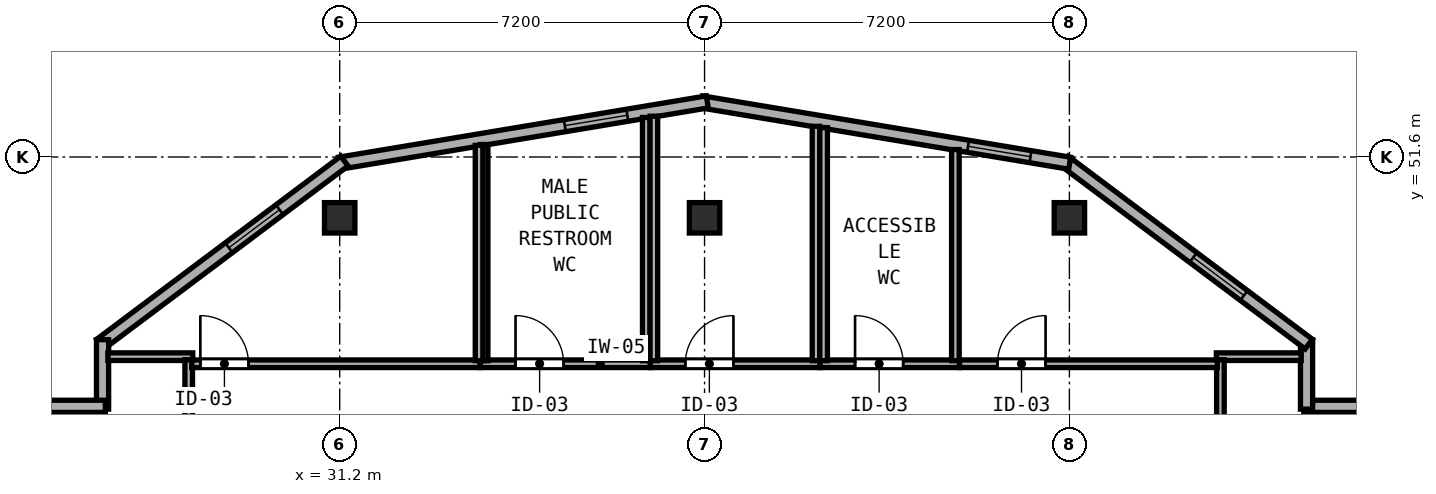
"""IFC4 building model, lengths in metres.
Left out: names, types, materials, properties, quantities, classifications, styles, units other than length and angle.
Written with IfcOpenShell. Run it as: python <this file> out.ifc"""

import sys

from ifc_helpers import new_model, si_unit, direction, frame, frame_2d, origin, origin_2d, place, context, subcontext, project, spatial, rectangle, hollow_rectangle, extrude, element, fill, save


model = new_model("IFC4")
c1 = context("Model", 3, precision=1e-05, world=origin(), true_north=direction((0.0, 1.0)))
c2 = subcontext(c1, "Body", "Model", "MODEL_VIEW")
j1 = project(units=[si_unit("LENGTHUNIT", "METRE"), si_unit("PLANEANGLEUNIT", "RADIAN")], contexts=[c1])
p1 = place(None, origin())
s1 = spatial("IfcSite", under=j1, at=p1, CompositionType="ELEMENT")
p2 = place(p1, origin())
s2 = spatial("IfcBuilding", under=s1, at=p2, CompositionType="ELEMENT")
p3 = place(p2, frame((0.0, 0.0, 323.2)))
s3 = spatial("IfcBuildingStorey", under=s2, at=p3, CompositionType="ELEMENT", Elevation=323.2)
for number, where, z_axis, x_axis in (
    (1, (31.2, 50.4, 0.0), (0.0, 0.0, 1.0), (1.0, 0.0, 0.0)),
    (2, (45.6, 50.4, 0.0), (0.0, 0.0, 1.0), (1.0, 0.0, 0.0)),
    (3, (38.4, 50.4, 0.0), (0.0, 0.0, 1.0), (1.0, 0.0, 0.0)),
):
    element("IfcColumn", number, at=place(p3, frame(where, z_axis=z_axis, x_axis=x_axis)), inside=s3, PredefinedType="COLUMN", context=c2, shape_type="SweptSolid", body=[
        extrude(hollow_rectangle(XDim=0.6, YDim=0.6, WallThickness=0.024, at=origin_2d()), origin(), (0.0, 0.0, 1.0), 5.0),
    ])
p4 = place(p3, frame((51.535, 46.68, 0.0), z_axis=(0.0, 0.0, 1.0), x_axis=(-1.0, 0.0, 0.0)))
e4 = element("IfcWall", 4, at=p4, inside=s3, PredefinedType="SOLIDWALL", context=c2, shape_type="SweptSolid", body=[
    extrude(rectangle(XDim=1.31, YDim=0.24, at=frame_2d((0.655, 0.0))), origin(), (0.0, 0.0, 1.0), 4.75),
])
p5 = place(p3, frame((50.28, 46.625, 0.0), z_axis=(0.0, 0.0, 1.0), x_axis=(0.0, 1.0, 0.0)))
e5 = element("IfcWall", 5, at=p5, inside=s3, PredefinedType="SOLIDWALL", context=c2, shape_type="SweptSolid", body=[
    extrude(rectangle(XDim=1.37, YDim=0.24, at=frame_2d((0.685, 0.0))), origin(), (0.0, 0.0, 1.0), 4.75),
])
p6 = place(p3, frame((50.324, 47.907, 0.0), z_axis=(0.0, 0.0, 1.0), x_axis=(-0.80001459783, 0.599980535734, 0.0)))
e6 = element("IfcWall", 6, at=p6, inside=s3, PredefinedType="SOLIDWALL", context=c2, shape_type="SweptSolid", body=[
    extrude(rectangle(XDim=6.021, YDim=0.24, at=frame_2d((3.01, 0.0))), origin(), (0.0, 0.0, 1.0), 4.75),
])
p7 = place(p6, frame((1.6, 0.0, 0.85)))
e7 = element("IfcOpeningElement", 7, at=p7, cuts=e6, PredefinedType="OPENING", context=c2, shape_type="SweptSolid", body=[
    extrude(rectangle(XDim=1.25, YDim=1.95, at=frame_2d((0.625, 0.975))), frame((0.0, 0.13, 0.0), z_axis=(0.0, -1.0, 0.0), x_axis=(1.0, 0.0, 0.0)), (0.0, 0.0, 1.0), 0.26),
])
p8 = place(p3, frame((45.606, 51.477, 0.0), z_axis=(0.0, 0.0, 1.0), x_axis=(-0.986394820321, 0.164393608283, 0.0)))
e8 = element("IfcWall", 8, at=p8, inside=s3, PredefinedType="SOLIDWALL", context=c2, shape_type="SweptSolid", body=[
    extrude(rectangle(XDim=7.36, YDim=0.24, at=frame_2d((3.68, 0.0))), origin(), (0.0, 0.0, 1.0), 4.75),
])
p9 = place(p8, frame((0.784, 0.0, 0.85)))
e9 = element("IfcOpeningElement", 9, at=p9, cuts=e8, PredefinedType="OPENING", context=c2, shape_type="SweptSolid", body=[
    extrude(rectangle(XDim=1.25, YDim=1.95, at=frame_2d((0.625, 0.975))), frame((0.0, 0.13, 0.0), z_axis=(0.0, -1.0, 0.0), x_axis=(1.0, 0.0, 0.0)), (0.0, 0.0, 1.0), 0.26),
])
p10 = place(p3, frame((38.454, 52.687, 0.0), z_axis=(0.0, 0.0, 1.0), x_axis=(-0.986394820321, -0.164393608283, 0.0)))
e10 = element("IfcWall", 10, at=p10, inside=s3, PredefinedType="SOLIDWALL", context=c2, shape_type="SweptSolid", body=[
    extrude(rectangle(XDim=7.36, YDim=0.24, at=frame_2d((3.68, 0.0))), origin(), (0.0, 0.0, 1.0), 4.75),
])
p11 = place(p10, frame((1.6, 0.0, 0.85)))
e11 = element("IfcOpeningElement", 11, at=p11, cuts=e10, PredefinedType="OPENING", context=c2, shape_type="SweptSolid", body=[
    extrude(rectangle(XDim=1.25, YDim=1.95, at=frame_2d((0.625, 0.975))), frame((0.0, 0.13, 0.0), z_axis=(0.0, -1.0, 0.0), x_axis=(1.0, 0.0, 0.0)), (0.0, 0.0, 1.0), 0.26),
])
p12 = place(p3, frame((31.292, 51.519, 0.0), z_axis=(0.0, 0.0, 1.0), x_axis=(-0.8, -0.6, 0.0)))
e12 = element("IfcWall", 12, at=p12, inside=s3, PredefinedType="SOLIDWALL", context=c2, shape_type="SweptSolid", body=[
    extrude(rectangle(XDim=6.021, YDim=0.24, at=frame_2d((3.01, 0.0))), origin(), (0.0, 0.0, 1.0), 4.75),
])
p13 = place(p12, frame((1.6, 0.0, 0.85)))
e13 = element("IfcOpeningElement", 13, at=p13, cuts=e12, PredefinedType="OPENING", context=c2, shape_type="SweptSolid", body=[
    extrude(rectangle(XDim=1.25, YDim=1.95, at=frame_2d((0.625, 0.975))), frame((0.0, 0.13, 0.0), z_axis=(0.0, -1.0, 0.0), x_axis=(1.0, 0.0, 0.0)), (0.0, 0.0, 1.0), 0.26),
])
p14 = place(p3, frame((26.52, 47.995, 0.0), z_axis=(0.0, 0.0, 1.0), x_axis=(0.0, -1.0, 0.0)))
e14 = element("IfcWall", 14, at=p14, inside=s3, PredefinedType="SOLIDWALL", context=c2, shape_type="SweptSolid", body=[
    extrude(rectangle(XDim=1.37, YDim=0.24, at=frame_2d((0.685, 0.0))), origin(), (0.0, 0.0, 1.0), 4.75),
])
p15 = place(p3, frame((26.575, 46.68, 0.0), z_axis=(0.0, 0.0, 1.0), x_axis=(-1.0, 0.0, 0.0)))
e15 = element("IfcWall", 15, at=p15, inside=s3, PredefinedType="SOLIDWALL", context=c2, shape_type="SweptSolid", body=[
    extrude(rectangle(XDim=1.31, YDim=0.24, at=frame_2d((0.655, 0.0))), origin(), (0.0, 0.0, 1.0), 4.75),
])
p16 = place(p3, frame((33.97, 47.52, 0.0), z_axis=(0.0, 0.0, 1.0), x_axis=(1.0, 0.0, 0.0)))
e16 = element("IfcWall", 16, at=p16, inside=s3, PredefinedType="PARTITIONING", context=c2, shape_type="SweptSolid", body=[
    extrude(rectangle(XDim=3.36, YDim=0.15, at=frame_2d((1.68, 0.0))), origin(), (0.0, 0.0, 1.0), 4.75),
])
p17 = place(p16, frame((0.7, 0.0, 0.0)))
e17 = element("IfcOpeningElement", 17, at=p17, cuts=e16, PredefinedType="OPENING", context=c2, shape_type="SweptSolid", body=[
    extrude(rectangle(XDim=0.95, YDim=2.12, at=frame_2d((0.475, 1.06))), frame((0.0, 0.085, 0.0), z_axis=(0.0, -1.0, 0.0), x_axis=(1.0, 0.0, 0.0)), (0.0, 0.0, 1.0), 0.17),
])
p18 = place(p3, frame((34.05, 47.58, 0.0), z_axis=(0.0, 0.0, 1.0), x_axis=(0.0, 1.0, 0.0)))
e18 = element("IfcWall", 18, at=p18, inside=s3, PredefinedType="PARTITIONING", context=c2, shape_type="SweptSolid", body=[
    extrude(rectangle(XDim=4.267, YDim=0.15, at=frame_2d((2.133, 0.0))), origin(), (0.0, 0.0, 1.0), 4.75),
])
p19 = place(p3, frame((37.25, 47.58, 0.0), z_axis=(0.0, 0.0, 1.0), x_axis=(0.0, 1.0, 0.0)))
e19 = element("IfcWall", 19, at=p19, inside=s3, PredefinedType="PARTITIONING", context=c2, shape_type="SweptSolid", body=[
    extrude(rectangle(XDim=4.8, YDim=0.15, at=frame_2d((2.4, 0.0))), origin(), (0.0, 0.0, 1.0), 4.75),
])
p20 = place(p3, frame((37.332, 47.52, 0.0), z_axis=(0.0, 0.0, 1.0), x_axis=(1.0, 0.0, 0.0)))
e20 = element("IfcWall", 20, at=p20, inside=s3, PredefinedType="PARTITIONING", context=c2, shape_type="SweptSolid", body=[
    extrude(rectangle(XDim=3.348, YDim=0.15, at=frame_2d((1.674, 0.0))), origin(), (0.0, 0.0, 1.0), 4.75),
])
p21 = place(p20, frame((0.688, 0.0, 0.0)))
e21 = element("IfcOpeningElement", 21, at=p21, cuts=e20, PredefinedType="OPENING", context=c2, shape_type="SweptSolid", body=[
    extrude(rectangle(XDim=0.95, YDim=2.12, at=frame_2d((0.475, 1.06))), frame((0.0, 0.085, 0.0), z_axis=(0.0, -1.0, 0.0), x_axis=(1.0, 0.0, 0.0)), (0.0, 0.0, 1.0), 0.17),
])
p22 = place(p3, frame((37.4, 47.58, 0.0), z_axis=(0.0, 0.0, 1.0), x_axis=(0.0, 1.0, 0.0)))
e22 = element("IfcWall", 22, at=p22, inside=s3, PredefinedType="PARTITIONING", context=c2, shape_type="SweptSolid", body=[
    extrude(rectangle(XDim=4.825, YDim=0.15, at=frame_2d((2.413, 0.0))), origin(), (0.0, 0.0, 1.0), 4.75),
])
p23 = place(p3, frame((40.6, 47.58, 0.0), z_axis=(0.0, 0.0, 1.0), x_axis=(0.0, 1.0, 0.0)))
e23 = element("IfcWall", 23, at=p23, inside=s3, PredefinedType="PARTITIONING", context=c2, shape_type="SweptSolid", body=[
    extrude(rectangle(XDim=4.625, YDim=0.15, at=frame_2d((2.312, 0.0))), origin(), (0.0, 0.0, 1.0), 4.75),
])
p24 = place(p3, frame((40.682, 47.52, 0.0), z_axis=(0.0, 0.0, 1.0), x_axis=(1.0, 0.0, 0.0)))
e24 = element("IfcWall", 24, at=p24, inside=s3, PredefinedType="PARTITIONING", context=c2, shape_type="SweptSolid", body=[
    extrude(rectangle(XDim=2.748, YDim=0.15, at=frame_2d((1.374, 0.0))), origin(), (0.0, 0.0, 1.0), 4.75),
])
p25 = place(p24, frame((0.688, 0.0, 0.0)))
e25 = element("IfcOpeningElement", 25, at=p25, cuts=e24, PredefinedType="OPENING", context=c2, shape_type="SweptSolid", body=[
    extrude(rectangle(XDim=0.95, YDim=2.12, at=frame_2d((0.475, 1.06))), frame((0.0, 0.085, 0.0), z_axis=(0.0, -1.0, 0.0), x_axis=(1.0, 0.0, 0.0)), (0.0, 0.0, 1.0), 0.17),
])
p26 = place(p3, frame((40.75, 47.58, 0.0), z_axis=(0.0, 0.0, 1.0), x_axis=(0.0, 1.0, 0.0)))
e26 = element("IfcWall", 26, at=p26, inside=s3, PredefinedType="PARTITIONING", context=c2, shape_type="SweptSolid", body=[
    extrude(rectangle(XDim=4.6, YDim=0.15, at=frame_2d((2.3, 0.0))), origin(), (0.0, 0.0, 1.0), 4.75),
])
p27 = place(p3, frame((43.35, 47.58, 0.0), z_axis=(0.0, 0.0, 1.0), x_axis=(0.0, 1.0, 0.0)))
e27 = element("IfcWall", 27, at=p27, inside=s3, PredefinedType="PARTITIONING", context=c2, shape_type="SweptSolid", body=[
    extrude(rectangle(XDim=4.167, YDim=0.15, at=frame_2d((2.083, 0.0))), origin(), (0.0, 0.0, 1.0), 4.75),
])
p28 = place(p3, frame((26.625, 47.66, 0.0), z_axis=(0.0, 0.0, 1.0), x_axis=(1.0, 0.0, 0.0)))
e28 = element("IfcWall", 28, at=p28, inside=s3, PredefinedType="PARTITIONING", context=c2, shape_type="SweptSolid", body=[
    extrude(rectangle(XDim=1.675, YDim=0.15, at=frame_2d((0.837, 0.0))), origin(), (0.0, 0.0, 1.0), 4.75),
])
p29 = place(p3, frame((28.22, 42.82, 0.0), z_axis=(0.0, 0.0, 1.0), x_axis=(0.0, 1.0, 0.0)))
e29 = element("IfcWall", 29, at=p29, inside=s3, PredefinedType="PARTITIONING", context=c2, shape_type="SweptSolid", body=[
    extrude(rectangle(XDim=4.78, YDim=0.15, at=frame_2d((2.39, 0.0))), origin(), (0.0, 0.0, 1.0), 4.75),
])
p30 = place(p29, frame((2.61, 0.0, 0.0), z_axis=(0.0, 0.0, 1.0), x_axis=(-1.0, 0.0, 0.0)))
e30 = element("IfcOpeningElement", 30, at=p30, cuts=e29, PredefinedType="OPENING", context=c2, shape_type="SweptSolid", body=[
    extrude(rectangle(XDim=0.95, YDim=2.12, at=frame_2d((0.475, 1.06))), frame((0.0, 0.085, 0.0), z_axis=(0.0, -1.0, 0.0), x_axis=(1.0, 0.0, 0.0)), (0.0, 0.0, 1.0), 0.17),
])
p31 = place(p3, frame((48.5, 47.66, 0.0), z_axis=(0.0, 0.0, 1.0), x_axis=(1.0, 0.0, 0.0)))
e31 = element("IfcWall", 31, at=p31, inside=s3, PredefinedType="PARTITIONING", context=c2, shape_type="SweptSolid", body=[
    extrude(rectangle(XDim=1.675, YDim=0.15, at=frame_2d((0.837, 0.0))), origin(), (0.0, 0.0, 1.0), 4.75),
])
p32 = place(p3, frame((48.58, 33.46, 0.0), z_axis=(0.0, 0.0, 1.0), x_axis=(0.0, 1.0, 0.0)))
e32 = element("IfcWall", 32, at=p32, inside=s3, PredefinedType="PARTITIONING", context=c2, shape_type="SweptSolid", body=[
    extrude(rectangle(XDim=14.14, YDim=0.15, at=frame_2d((7.07, 0.0))), origin(), (0.0, 0.0, 1.0), 4.75),
])
p33 = place(p32, frame((4.06, 0.0, 0.0)))
e33 = element("IfcOpeningElement", 33, at=p33, cuts=e32, PredefinedType="OPENING", context=c2, shape_type="SweptSolid", body=[
    extrude(rectangle(XDim=0.95, YDim=2.12, at=frame_2d((0.475, 1.06))), frame((0.0, 0.085, 0.0), z_axis=(0.0, -1.0, 0.0), x_axis=(1.0, 0.0, 0.0)), (0.0, 0.0, 1.0), 0.17),
])
p34 = place(p3, frame((28.28, 47.52, 0.0), z_axis=(0.0, 0.0, 1.0), x_axis=(1.0, 0.0, 0.0)))
e34 = element("IfcWall", 34, at=p34, inside=s3, PredefinedType="PARTITIONING", context=c2, shape_type="SweptSolid", body=[
    extrude(rectangle(XDim=5.688, YDim=0.15, at=frame_2d((2.844, 0.0))), origin(), (0.0, 0.0, 1.0), 4.75),
])
p35 = place(p34, frame((0.17, 0.0, 0.0)))
e35 = element("IfcOpeningElement", 35, at=p35, cuts=e34, PredefinedType="OPENING", context=c2, shape_type="SweptSolid", body=[
    extrude(rectangle(XDim=0.95, YDim=2.12, at=frame_2d((0.475, 1.06))), frame((0.0, 0.085, 0.0), z_axis=(0.0, -1.0, 0.0), x_axis=(1.0, 0.0, 0.0)), (0.0, 0.0, 1.0), 0.17),
])
p36 = place(p3, frame((33.95, 47.58, 0.0), z_axis=(0.0, 0.0, 1.0), x_axis=(0.0, 1.0, 0.0)))
e36 = element("IfcWall", 36, at=p36, inside=s3, PredefinedType="PARTITIONING", context=c2, shape_type="SweptSolid", body=[
    extrude(rectangle(XDim=4.25, YDim=0.15, at=frame_2d((2.125, 0.0))), origin(), (0.0, 0.0, 1.0), 4.75),
])
p37 = place(p3, frame((43.432, 47.52, 0.0), z_axis=(0.0, 0.0, 1.0), x_axis=(1.0, 0.0, 0.0)))
e37 = element("IfcWall", 37, at=p37, inside=s3, PredefinedType="PARTITIONING", context=c2, shape_type="SweptSolid", body=[
    extrude(rectangle(XDim=5.088, YDim=0.15, at=frame_2d((2.544, 0.0))), origin(), (0.0, 0.0, 1.0), 4.75),
])
p38 = place(p37, frame((0.748, 0.0, 0.0)))
e38 = element("IfcOpeningElement", 38, at=p38, cuts=e37, PredefinedType="OPENING", context=c2, shape_type="SweptSolid", body=[
    extrude(rectangle(XDim=0.95, YDim=2.12, at=frame_2d((0.475, 1.06))), frame((0.0, 0.085, 0.0), z_axis=(0.0, -1.0, 0.0), x_axis=(1.0, 0.0, 0.0)), (0.0, 0.0, 1.0), 0.17),
])
p39 = place(p7, origin())
e39 = element("IfcWindow", 39, at=p39, inside=s3, PartitioningType="SINGLE_PANEL", PredefinedType="WINDOW", context=c2, shape_type="SweptSolid", body=[
    extrude(rectangle(XDim=1.25, YDim=1.95, at=frame_2d((0.625, 0.975))), frame((0.0, 0.03, 0.0), z_axis=(0.0, -1.0, 0.0), x_axis=(1.0, 0.0, 0.0)), (0.0, 0.0, 1.0), 0.06),
])
fill(e7, e39)
p40 = place(p9, origin())
e40 = element("IfcWindow", 40, at=p40, inside=s3, PartitioningType="SINGLE_PANEL", PredefinedType="WINDOW", context=c2, shape_type="SweptSolid", body=[
    extrude(rectangle(XDim=1.25, YDim=1.95, at=frame_2d((0.625, 0.975))), frame((0.0, 0.03, 0.0), z_axis=(0.0, -1.0, 0.0), x_axis=(1.0, 0.0, 0.0)), (0.0, 0.0, 1.0), 0.06),
])
fill(e9, e40)
p41 = place(p11, origin())
e41 = element("IfcWindow", 41, at=p41, inside=s3, PartitioningType="SINGLE_PANEL", PredefinedType="WINDOW", context=c2, shape_type="SweptSolid", body=[
    extrude(rectangle(XDim=1.25, YDim=1.95, at=frame_2d((0.625, 0.975))), frame((0.0, 0.03, 0.0), z_axis=(0.0, -1.0, 0.0), x_axis=(1.0, 0.0, 0.0)), (0.0, 0.0, 1.0), 0.06),
])
fill(e11, e41)
p42 = place(p13, origin())
e42 = element("IfcWindow", 42, at=p42, inside=s3, PartitioningType="SINGLE_PANEL", PredefinedType="WINDOW", context=c2, shape_type="SweptSolid", body=[
    extrude(rectangle(XDim=1.25, YDim=1.95, at=frame_2d((0.625, 0.975))), frame((0.0, 0.03, 0.0), z_axis=(0.0, -1.0, 0.0), x_axis=(1.0, 0.0, 0.0)), (0.0, 0.0, 1.0), 0.06),
])
fill(e13, e42)
p43 = place(p3, frame((0.0, 0.0, -0.24)))
p44 = place(p43, frame((34.8, 49.8, 0.0)))
p45 = place(p44, frame((0.0, 0.0, 0.19)))
e43 = element("IfcWindow", 43, at=p45, inside=s3, PartitioningType="SINGLE_PANEL", PredefinedType="SKYLIGHT", context=c2, shape_type="SweptSolid", body=[
    extrude(rectangle(XDim=1.6, YDim=1.6, at=origin_2d()), origin(), (0.0, 0.0, 1.0), 0.05),
])
p46 = place(p43, frame((42.0, 49.8, 0.0)))
p47 = place(p46, frame((0.0, 0.0, 0.19)))
e44 = element("IfcWindow", 44, at=p47, inside=s3, PartitioningType="SINGLE_PANEL", PredefinedType="SKYLIGHT", context=c2, shape_type="SweptSolid", body=[
    extrude(rectangle(XDim=1.6, YDim=1.6, at=origin_2d()), origin(), (0.0, 0.0, 1.0), 0.05),
])
p48 = place(p17, origin())
e45 = element("IfcDoor", 45, at=p48, inside=s3, OperationType="SINGLE_SWING_LEFT", PredefinedType="DOOR", context=c2, shape_type="SweptSolid", body=[
    extrude(rectangle(XDim=0.95, YDim=2.12, at=frame_2d((0.475, 1.06))), frame((0.0, 0.025, 0.0), z_axis=(0.0, -1.0, 0.0), x_axis=(1.0, 0.0, 0.0)), (0.0, 0.0, 1.0), 0.05),
])
fill(e17, e45)
p49 = place(p21, origin())
e46 = element("IfcDoor", 46, at=p49, inside=s3, OperationType="SINGLE_SWING_RIGHT", PredefinedType="DOOR", context=c2, shape_type="SweptSolid", body=[
    extrude(rectangle(XDim=0.95, YDim=2.12, at=frame_2d((0.475, 1.06))), frame((0.0, 0.025, 0.0), z_axis=(0.0, -1.0, 0.0), x_axis=(1.0, 0.0, 0.0)), (0.0, 0.0, 1.0), 0.05),
])
fill(e21, e46)
p50 = place(p25, origin())
e47 = element("IfcDoor", 47, at=p50, inside=s3, OperationType="SINGLE_SWING_LEFT", PredefinedType="DOOR", context=c2, shape_type="SweptSolid", body=[
    extrude(rectangle(XDim=0.95, YDim=2.12, at=frame_2d((0.475, 1.06))), frame((0.0, 0.025, 0.0), z_axis=(0.0, -1.0, 0.0), x_axis=(1.0, 0.0, 0.0)), (0.0, 0.0, 1.0), 0.05),
])
fill(e25, e47)
p51 = place(p35, origin())
e48 = element("IfcDoor", 48, at=p51, inside=s3, OperationType="SINGLE_SWING_LEFT", PredefinedType="DOOR", context=c2, shape_type="SweptSolid", body=[
    extrude(rectangle(XDim=0.95, YDim=2.12, at=frame_2d((0.475, 1.06))), frame((0.0, 0.025, 0.0), z_axis=(0.0, -1.0, 0.0), x_axis=(1.0, 0.0, 0.0)), (0.0, 0.0, 1.0), 0.05),
])
fill(e35, e48)
p52 = place(p38, origin())
e49 = element("IfcDoor", 49, at=p52, inside=s3, OperationType="SINGLE_SWING_RIGHT", PredefinedType="DOOR", context=c2, shape_type="SweptSolid", body=[
    extrude(rectangle(XDim=0.95, YDim=2.12, at=frame_2d((0.475, 1.06))), frame((0.0, 0.025, 0.0), z_axis=(0.0, -1.0, 0.0), x_axis=(1.0, 0.0, 0.0)), (0.0, 0.0, 1.0), 0.05),
])
fill(e38, e49)
save(model, sys.argv[1])
